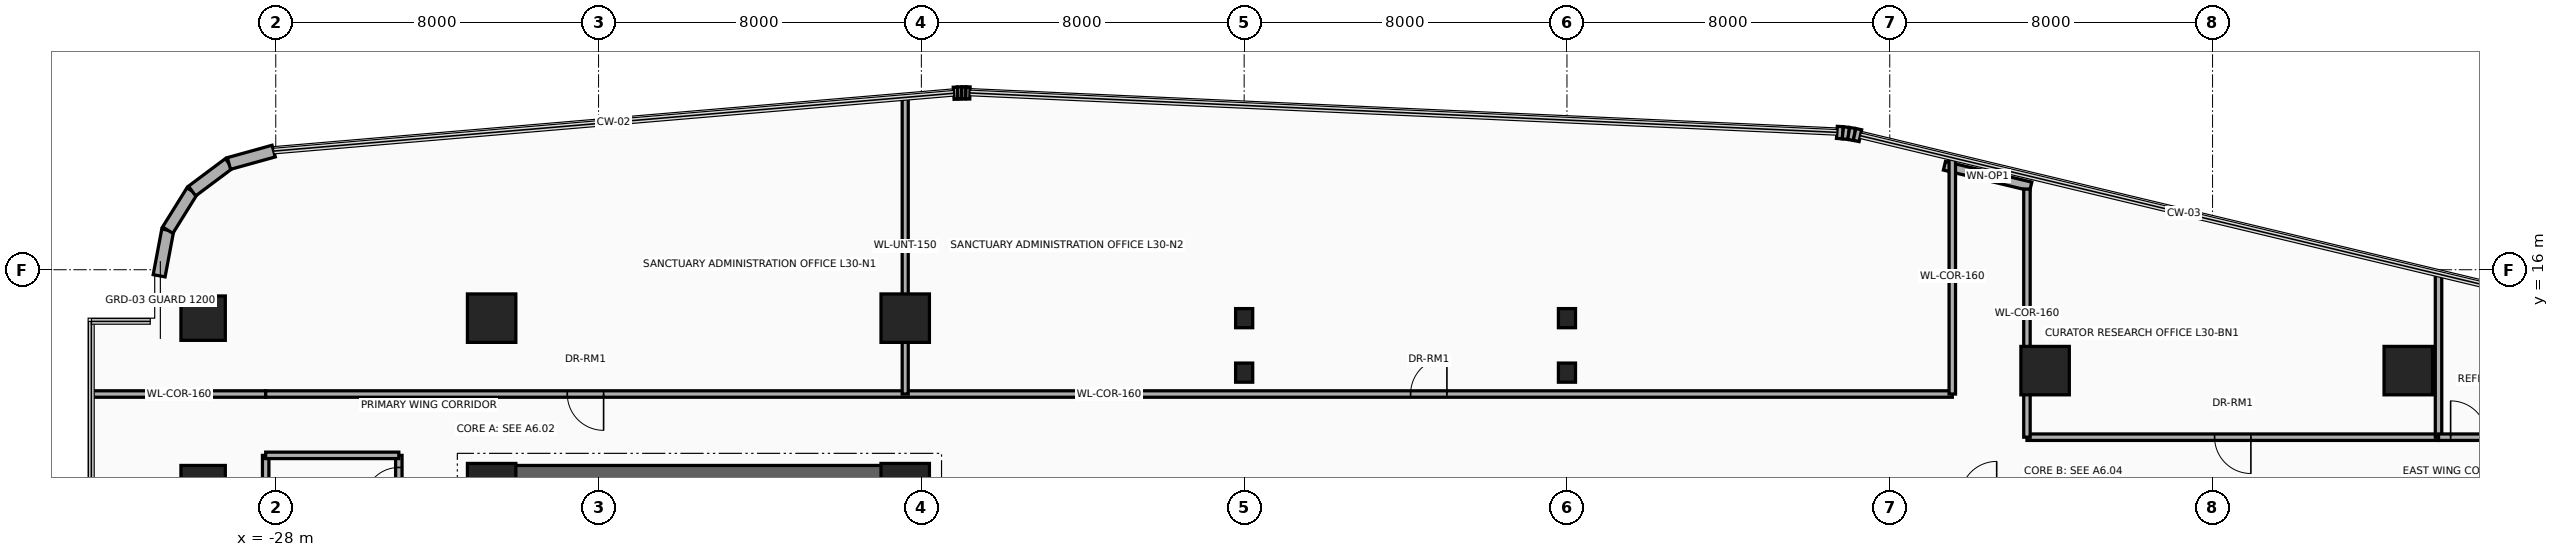
"""IFC4 building model, lengths in metres.
Left out: names, types, materials, properties, quantities, classifications, styles, units other than length and angle.
Written with IfcOpenShell. Run it as: python <this file> out.ifc"""

import sys

from ifc_helpers import new_model, si_unit, direction, frame, frame_2d, origin, origin_2d, place, context, subcontext, project, spatial, rectangle, circle, i_section, extrude, source, transform, mapped, element, fill, save


model = new_model("IFC4")
c1 = context("Model", 3, precision=1e-05, world=origin(), true_north=direction((0.0, 1.0)))
c2 = subcontext(c1, "Body", "Model", "MODEL_VIEW")
j1 = project(units=[si_unit("LENGTHUNIT", "METRE"), si_unit("PLANEANGLEUNIT", "RADIAN")], contexts=[c1])
p1 = place(None, origin())
s1 = spatial("IfcSite", under=j1, at=p1, CompositionType="ELEMENT")
p2 = place(p1, origin())
s2 = spatial("IfcBuilding", under=s1, at=p2, CompositionType="ELEMENT")
p3 = place(p2, frame((0.0, 0.0, 120.5)))
s3 = spatial("IfcBuildingStorey", under=s2, at=p3, CompositionType="ELEMENT", Elevation=120.5)
p4 = place(p3, frame((-22.65, -11.15, 0.0), z_axis=(0.0, 0.0, 1.0), x_axis=(0.0, 1.0, 0.0)))
e1 = element("IfcWall", 1, at=p4, inside=s3, PredefinedType="SHEAR", context=c2, shape_type="SweptSolid", body=[
    extrude(rectangle(XDim=22.3, YDim=0.7, at=frame_2d((11.15, 0.0))), origin(), (0.0, 0.0, 1.0), 3.46),
])
p5 = place(p3, frame((-22.65, 10.8, 0.0), z_axis=(0.0, 0.0, 1.0), x_axis=(1.0, 0.0, 0.0)))
e2 = element("IfcWall", 2, at=p5, inside=s3, PredefinedType="SHEAR", context=c2, shape_type="SweptSolid", body=[
    extrude(rectangle(XDim=10.25, YDim=0.7, at=frame_2d((5.125, 0.0))), origin(), (0.0, 0.0, 1.0), 3.46),
])
m1 = source(origin(), c2, "Body", "SweptSolid", [
    extrude(circle(Radius=0.55, at=origin_2d()), origin(), (0.0, 0.0, 1.0), 3.7),
])
p6 = place(p3, frame((-29.8, 10.6, 0.0), z_axis=(0.0, 0.0, 1.0), x_axis=(1.0, 0.0, 0.0)))
e3 = element("IfcColumn", 3, at=p6, inside=s3, PredefinedType="COLUMN", context=c2, shape_type="MappedRepresentation", body=[
    mapped(m1, transform((0.0, 0.0, 0.0), x_axis=(1.0, 0.0, 0.0), y_axis=(0.0, 1.0, 0.0), z_axis=(0.0, 0.0, 1.0), scale=1.0)),
])
m2 = source(origin(), c2, "Body", "SweptSolid", [
    extrude(rectangle(XDim=1.2, YDim=1.2, at=origin_2d()), origin(), (0.0, 0.0, 1.0), 3.7),
])
for number, where, z_axis, x_axis in (
    (4, (-22.65, 10.6, 0.0), (0.0, 0.0, 1.0), (1.0, 0.0, 0.0)),
    (5, (-12.4, 10.6, 0.0), (0.0, 0.0, 1.0), (1.0, 0.0, 0.0)),
):
    element("IfcColumn", number, at=place(p3, frame(where, z_axis=z_axis, x_axis=x_axis)), inside=s3, PredefinedType="COLUMN", context=c2, shape_type="MappedRepresentation", body=[
        mapped(m2, transform((0.0, 0.0, 0.0), x_axis=(1.0, 0.0, 0.0), y_axis=(0.0, 1.0, 0.0), z_axis=(0.0, 0.0, 1.0), scale=1.0)),
    ])
p7 = place(p3, frame((-29.8, 14.8, 0.0), z_axis=(0.0, 0.0, 1.0), x_axis=(1.0, 0.0, 0.0)))
e6 = element("IfcColumn", 6, at=p7, inside=s3, PredefinedType="COLUMN", context=c2, shape_type="MappedRepresentation", body=[
    mapped(m1, transform((0.0, 0.0, 0.0), x_axis=(1.0, 0.0, 0.0), y_axis=(0.0, 1.0, 0.0), z_axis=(0.0, 0.0, 1.0), scale=1.0)),
])
for number, where, z_axis, x_axis in (
    (7, (-22.65, 14.8, 0.0), (0.0, 0.0, 1.0), (1.0, 0.0, 0.0)),
    (8, (-12.4, 14.8, 0.0), (0.0, 0.0, 1.0), (1.0, 0.0, 0.0)),
    (9, (15.85, 13.5, 0.0), (0.0, 0.0, 1.0), (1.0, 0.0, 0.0)),
    (10, (24.85, 13.5, 0.0), (0.0, 0.0, 1.0), (1.0, 0.0, 0.0)),
):
    element("IfcColumn", number, at=place(p3, frame(where, z_axis=z_axis, x_axis=x_axis)), inside=s3, PredefinedType="COLUMN", context=c2, shape_type="MappedRepresentation", body=[
        mapped(m2, transform((0.0, 0.0, 0.0), x_axis=(1.0, 0.0, 0.0), y_axis=(0.0, 1.0, 0.0), z_axis=(0.0, 0.0, 1.0), scale=1.0)),
    ])
m3 = source(origin(), c2, "Body", "SweptSolid", [
    extrude(i_section(OverallWidth=0.424, OverallDepth=0.474, WebThickness=0.048, FlangeThickness=0.077, at=origin_2d()), origin(), (0.0, 0.0, 1.0), 3.7),
])
for number, where, z_axis, x_axis in (
    (11, (-4.0, 13.45, 0.0), (0.0, 0.0, 1.0), (1.0, 0.0, 0.0)),
    (12, (-4.0, 14.8, 0.0), (0.0, 0.0, 1.0), (1.0, 0.0, 0.0)),
    (13, (4.0, 13.45, 0.0), (0.0, 0.0, 1.0), (1.0, 0.0, 0.0)),
    (14, (4.0, 14.8, 0.0), (0.0, 0.0, 1.0), (1.0, 0.0, 0.0)),
):
    element("IfcColumn", number, at=place(p3, frame(where, z_axis=z_axis, x_axis=x_axis)), inside=s3, PredefinedType="COLUMN", context=c2, shape_type="MappedRepresentation", body=[
        mapped(m3, transform((0.0, 0.0, 0.0), x_axis=(1.0, 0.0, 0.0), y_axis=(0.0, 1.0, 0.0), z_axis=(0.0, 0.0, 1.0), scale=1.0)),
    ])
p8 = place(p3, frame((-30.89, 15.85, 0.0), z_axis=(0.0, 0.0, 1.0), x_axis=(0.184557499391, 0.982821718023, 0.0)))
e15 = element("IfcWall", 15, at=p8, inside=s3, PredefinedType="SOLIDWALL", context=c2, shape_type="SweptSolid", body=[
    extrude(rectangle(XDim=1.151, YDim=0.3, at=frame_2d((0.575, 0.0))), origin(), (0.0, 0.0, 1.0), 3.46),
])
p9 = place(p3, frame((-30.677, 16.981, 0.0), z_axis=(0.0, 0.0, 1.0), x_axis=(0.52880576008, 0.848742875143, 0.0)))
e16 = element("IfcWall", 16, at=p9, inside=s3, PredefinedType="SOLIDWALL", context=c2, shape_type="SweptSolid", body=[
    extrude(rectangle(XDim=1.141, YDim=0.3, at=frame_2d((0.57, 0.0))), origin(), (0.0, 0.0, 1.0), 3.46),
])
p10 = place(p3, frame((-30.074, 17.95, 0.0), z_axis=(0.0, 0.0, 1.0), x_axis=(0.800975009324, 0.598697782223, 0.0)))
e17 = element("IfcWall", 17, at=p10, inside=s3, PredefinedType="SOLIDWALL", context=c2, shape_type="SweptSolid", body=[
    extrude(rectangle(XDim=1.141, YDim=0.3, at=frame_2d((0.57, 0.0))), origin(), (0.0, 0.0, 1.0), 3.46),
])
p11 = place(p3, frame((-29.161, 18.633, 0.0), z_axis=(0.0, 0.0, 1.0), x_axis=(0.963624193367, 0.267260947313, 0.0)))
e18 = element("IfcWall", 18, at=p11, inside=s3, PredefinedType="SOLIDWALL", context=c2, shape_type="SweptSolid", body=[
    extrude(rectangle(XDim=1.151, YDim=0.3, at=frame_2d((0.575, 0.0))), origin(), (0.0, 0.0, 1.0), 3.46),
])
p12 = place(p3, frame((-11.199, 20.373, 0.0), z_axis=(0.0, 0.0, 1.0), x_axis=(0.997567332166, 0.069709524416, 0.0)))
e19 = element("IfcWall", 19, at=p12, inside=s3, PredefinedType="SOLIDWALL", context=c2, shape_type="SweptSolid", body=[
    extrude(rectangle(XDim=0.102, YDim=0.3, at=frame_2d((0.051, 0.0))), origin(), (0.0, 0.0, 1.0), 3.46),
])
p13 = place(p3, frame((-11.098, 20.38, 0.0), z_axis=(0.0, 0.0, 1.0), x_axis=(0.999334672785, 0.03647206835, 0.0)))
e20 = element("IfcWall", 20, at=p13, inside=s3, PredefinedType="SOLIDWALL", context=c2, shape_type="SweptSolid", body=[
    extrude(rectangle(XDim=0.1, YDim=0.3, at=frame_2d((0.05, 0.0))), origin(), (0.0, 0.0, 1.0), 3.46),
])
p14 = place(p3, frame((-10.998, 20.383, 0.0), z_axis=(0.0, 0.0, 1.0), x_axis=(0.999997054401, 0.002427177317, 0.0)))
e21 = element("IfcWall", 21, at=p14, inside=s3, PredefinedType="SOLIDWALL", context=c2, shape_type="SweptSolid", body=[
    extrude(rectangle(XDim=0.101, YDim=0.3, at=frame_2d((0.05, 0.0))), origin(), (0.0, 0.0, 1.0), 3.46),
])
p15 = place(p3, frame((-10.897, 20.384, 0.0), z_axis=(0.0, 0.0, 1.0), x_axis=(0.999584209171, -0.02883415988, 0.0)))
e22 = element("IfcWall", 22, at=p15, inside=s3, PredefinedType="SOLIDWALL", context=c2, shape_type="SweptSolid", body=[
    extrude(rectangle(XDim=0.102, YDim=0.3, at=frame_2d((0.051, 0.0))), origin(), (0.0, 0.0, 1.0), 3.46),
])
p16 = place(p3, frame((10.69, 19.404, 0.0), z_axis=(0.0, 0.0, 1.0), x_axis=(0.99758310784, -0.069483400546, 0.0)))
e23 = element("IfcWall", 23, at=p16, inside=s3, PredefinedType="SOLIDWALL", context=c2, shape_type="SweptSolid", body=[
    extrude(rectangle(XDim=0.147, YDim=0.3, at=frame_2d((0.074, 0.0))), origin(), (0.0, 0.0, 1.0), 3.46),
])
for number, where, z_axis, x_axis in (
    (24, (10.837, 19.394, 0.0), (0.0, 0.0, 1.0), (0.993, -0.117, 0.0)),
    (25, (10.983, 19.377, 0.0), (0.0, 0.0, 1.0), (0.987, -0.163, 0.0)),
):
    element("IfcWall", number, at=place(p3, frame(where, z_axis=z_axis, x_axis=x_axis)), inside=s3, PredefinedType="SOLIDWALL", context=c2, shape_type="SweptSolid", body=[
        extrude(rectangle(XDim=0.146, YDim=0.3, at=frame_2d((0.073, 0.0))), origin(), (0.0, 0.0, 1.0), 3.46),
    ])
p17 = place(p3, frame((11.127, 19.353, 0.0), z_axis=(0.0, 0.0, 1.0), x_axis=(0.978019841688, -0.208511844421, 0.0)))
e26 = element("IfcWall", 26, at=p17, inside=s3, PredefinedType="SOLIDWALL", context=c2, shape_type="SweptSolid", body=[
    extrude(rectangle(XDim=0.147, YDim=0.3, at=frame_2d((0.074, 0.0))), origin(), (0.0, 0.0, 1.0), 3.46),
])
p18 = place(p3, frame((13.355, 18.576, 0.0), z_axis=(0.0, 0.0, 1.0), x_axis=(0.97252211384, -0.232810519721, 0.0)))
e27 = element("IfcWall", 27, at=p18, inside=s3, PredefinedType="SOLIDWALL", context=c2, shape_type="SweptSolid", body=[
    extrude(rectangle(XDim=2.2, YDim=0.22, at=frame_2d((1.1, 0.0))), origin(), (0.0, 0.0, 1.0), 3.46),
])
p19 = place(p18, frame((0.65, 0.0, 0.95)))
e28 = element("IfcOpeningElement", 28, at=p19, cuts=e27, PredefinedType="OPENING", context=c2, shape_type="SweptSolid", body=[
    extrude(rectangle(XDim=0.9, YDim=1.3, at=frame_2d((0.45, 0.65))), frame((0.0, 0.125, 0.0), z_axis=(0.0, -1.0, 0.0), x_axis=(1.0, 0.0, 0.0)), (0.0, 0.0, 1.0), 0.25),
])
p20 = place(p3, frame((-28.25, 8.8, 0.0), z_axis=(0.0, 0.0, 1.0), x_axis=(0.0, 1.0, 0.0)))
e29 = element("IfcWall", 29, at=p20, inside=s3, PredefinedType="PARTITIONING", context=c2, shape_type="SweptSolid", body=[
    extrude(rectangle(XDim=2.6, YDim=0.16, at=frame_2d((1.3, 0.0))), origin(), (0.0, 0.0, 1.0), 2.666),
])
p21 = place(p3, frame((-24.95, 8.8, 0.0), z_axis=(0.0, 0.0, 1.0), x_axis=(0.0, 1.0, 0.0)))
e30 = element("IfcWall", 30, at=p21, inside=s3, PredefinedType="PARTITIONING", context=c2, shape_type="SweptSolid", body=[
    extrude(rectangle(XDim=2.6, YDim=0.16, at=frame_2d((1.3, 0.0))), origin(), (0.0, 0.0, 1.0), 2.666),
])
p22 = place(p21, frame((0.3, 0.0, 0.0)))
e31 = element("IfcOpeningElement", 31, at=p22, cuts=e30, PredefinedType="OPENING", context=c2, shape_type="SweptSolid", body=[
    extrude(rectangle(XDim=0.85, YDim=2.1, at=frame_2d((0.425, 1.05))), frame((0.0, 0.095, 0.0), z_axis=(0.0, -1.0, 0.0), x_axis=(1.0, 0.0, 0.0)), (0.0, 0.0, 1.0), 0.19),
])
p23 = place(p21, frame((1.45, 0.0, 0.0)))
e32 = element("IfcOpeningElement", 32, at=p23, cuts=e30, PredefinedType="OPENING", context=c2, shape_type="SweptSolid", body=[
    extrude(rectangle(XDim=0.85, YDim=2.1, at=frame_2d((0.425, 1.05))), frame((0.0, 0.095, 0.0), z_axis=(0.0, -1.0, 0.0), x_axis=(1.0, 0.0, 0.0)), (0.0, 0.0, 1.0), 0.19),
])
p24 = place(p3, frame((-28.25, 11.4, 0.0), z_axis=(0.0, 0.0, 1.0), x_axis=(1.0, 0.0, 0.0)))
e33 = element("IfcWall", 33, at=p24, inside=s3, PredefinedType="PARTITIONING", context=c2, shape_type="SweptSolid", body=[
    extrude(rectangle(XDim=3.3, YDim=0.16, at=frame_2d((1.65, 0.0))), origin(), (0.0, 0.0, 1.0), 3.46),
])
p25 = place(p3, frame((-32.54, 12.92, 0.0), z_axis=(0.0, 0.0, 1.0), x_axis=(1.0, 0.0, 0.0)))
e34 = element("IfcWall", 34, at=p25, inside=s3, PredefinedType="PARTITIONING", context=c2, shape_type="SweptSolid", body=[
    extrude(rectangle(XDim=4.29, YDim=0.16, at=frame_2d((2.145, 0.0))), origin(), (0.0, 0.0, 1.0), 2.896),
])
p26 = place(p3, frame((-28.25, 12.92, 0.0), z_axis=(0.0, 0.0, 1.0), x_axis=(1.0, 0.0, 0.0)))
e35 = element("IfcWall", 35, at=p26, inside=s3, PredefinedType="PARTITIONING", context=c2, shape_type="SweptSolid", body=[
    extrude(rectangle(XDim=41.8, YDim=0.16, at=frame_2d((20.9, 0.0))), origin(), (0.0, 0.0, 1.0), 2.666),
])
p27 = place(p26, frame((7.475, 0.0, 0.0)))
e36 = element("IfcOpeningElement", 36, at=p27, cuts=e35, PredefinedType="OPENING", context=c2, shape_type="SweptSolid", body=[
    extrude(rectangle(XDim=0.9, YDim=2.1, at=frame_2d((0.45, 1.05))), frame((0.0, 0.095, 0.0), z_axis=(0.0, -1.0, 0.0), x_axis=(1.0, 0.0, 0.0)), (0.0, 0.0, 1.0), 0.19),
])
p28 = place(p26, frame((28.375, 0.0, 0.0)))
e37 = element("IfcOpeningElement", 37, at=p28, cuts=e35, PredefinedType="OPENING", context=c2, shape_type="SweptSolid", body=[
    extrude(rectangle(XDim=0.9, YDim=2.1, at=frame_2d((0.45, 1.05))), frame((0.0, 0.095, 0.0), z_axis=(0.0, -1.0, 0.0), x_axis=(1.0, 0.0, 0.0)), (0.0, 0.0, 1.0), 0.19),
])
p29 = place(p3, frame((13.55, 12.92, 0.0), z_axis=(0.0, 0.0, 1.0), x_axis=(0.0, 1.0, 0.0)))
e38 = element("IfcWall", 38, at=p29, inside=s3, PredefinedType="PARTITIONING", context=c2, shape_type="SweptSolid", body=[
    extrude(rectangle(XDim=5.857, YDim=0.16, at=frame_2d((2.928, 0.0))), origin(), (0.0, 0.0, 1.0), 2.666),
])
p30 = place(p3, frame((-12.4, 12.92, 0.0), z_axis=(0.0, 0.0, 1.0), x_axis=(0.0, 1.0, 0.0)))
e39 = element("IfcWall", 39, at=p30, inside=s3, PredefinedType="PARTITIONING", context=c2, shape_type="SweptSolid", body=[
    extrude(rectangle(XDim=7.351, YDim=0.15, at=frame_2d((3.675, 0.0))), origin(), (0.0, 0.0, 1.0), 2.666),
])
p31 = place(p3, frame((15.4, 11.85, 0.0), z_axis=(0.0, 0.0, 1.0), x_axis=(1.0, 0.0, 0.0)))
e40 = element("IfcWall", 40, at=p31, inside=s3, PredefinedType="PARTITIONING", context=c2, shape_type="SweptSolid", body=[
    extrude(rectangle(XDim=10.2, YDim=0.16, at=frame_2d((5.1, 0.0))), origin(), (0.0, 0.0, 1.0), 2.834),
])
p32 = place(p31, frame((4.65, 0.0, 0.0)))
e41 = element("IfcOpeningElement", 41, at=p32, cuts=e40, PredefinedType="OPENING", context=c2, shape_type="SweptSolid", body=[
    extrude(rectangle(XDim=0.9, YDim=2.1, at=frame_2d((0.45, 1.05))), frame((0.0, 0.095, 0.0), z_axis=(0.0, -1.0, 0.0), x_axis=(1.0, 0.0, 0.0)), (0.0, 0.0, 1.0), 0.19),
])
p33 = place(p3, frame((15.4, 11.85, 0.0), z_axis=(0.0, 0.0, 1.0), x_axis=(0.0, 1.0, 0.0)))
e42 = element("IfcWall", 42, at=p33, inside=s3, PredefinedType="PARTITIONING", context=c2, shape_type="SweptSolid", body=[
    extrude(rectangle(XDim=6.15, YDim=0.16, at=frame_2d((3.075, 0.0))), origin(), (0.0, 0.0, 1.0), 2.666),
])
p34 = place(p3, frame((25.6, 11.85, 0.0), z_axis=(0.0, 0.0, 1.0), x_axis=(0.0, 1.0, 0.0)))
e43 = element("IfcWall", 43, at=p34, inside=s3, PredefinedType="PARTITIONING", context=c2, shape_type="SweptSolid", body=[
    extrude(rectangle(XDim=4.042, YDim=0.16, at=frame_2d((2.021, 0.0))), origin(), (0.0, 0.0, 1.0), 2.666),
])
p35 = place(p3, frame((25.6, 11.85, 0.0), z_axis=(0.0, 0.0, 1.0), x_axis=(1.0, 0.0, 0.0)))
e44 = element("IfcWall", 44, at=p35, inside=s3, PredefinedType="PARTITIONING", context=c2, shape_type="SweptSolid", body=[
    extrude(rectangle(XDim=4.09, YDim=0.16, at=frame_2d((2.045, 0.0))), origin(), (0.0, 0.0, 1.0), 2.896),
])
p36 = place(p35, frame((0.3, 0.0, 0.0)))
e45 = element("IfcOpeningElement", 45, at=p36, cuts=e44, PredefinedType="OPENING", context=c2, shape_type="SweptSolid", body=[
    extrude(rectangle(XDim=0.9, YDim=2.1, at=frame_2d((0.45, 1.05))), frame((0.0, 0.095, 0.0), z_axis=(0.0, -1.0, 0.0), x_axis=(1.0, 0.0, 0.0)), (0.0, 0.0, 1.0), 0.19),
])
p37 = place(p19, origin())
e46 = element("IfcWindow", 46, at=p37, inside=s3, PartitioningType="SINGLE_PANEL", PredefinedType="WINDOW", context=c2, shape_type="SweptSolid", body=[
    extrude(rectangle(XDim=0.9, YDim=1.3, at=frame_2d((0.45, 0.65))), frame((0.0, 0.03, 0.0), z_axis=(0.0, -1.0, 0.0), x_axis=(1.0, 0.0, 0.0)), (0.0, 0.0, 1.0), 0.06),
])
fill(e28, e46)
p38 = place(p23, origin())
e47 = element("IfcDoor", 47, at=p38, inside=s3, OperationType="SINGLE_SWING_RIGHT", PredefinedType="DOOR", context=c2, shape_type="SweptSolid", body=[
    extrude(rectangle(XDim=0.85, YDim=2.1, at=frame_2d((0.425, 1.05))), frame((0.0, 0.025, 0.0), z_axis=(0.0, -1.0, 0.0), x_axis=(1.0, 0.0, 0.0)), (0.0, 0.0, 1.0), 0.05),
])
fill(e32, e47)
p39 = place(p27, frame((0.9, 0.0, 0.0), z_axis=(0.0, 0.0, 1.0), x_axis=(-1.0, 0.0, 0.0)))
e48 = element("IfcDoor", 48, at=p39, inside=s3, OperationType="SINGLE_SWING_LEFT", PredefinedType="DOOR", context=c2, shape_type="SweptSolid", body=[
    extrude(rectangle(XDim=0.9, YDim=2.1, at=frame_2d((0.45, 1.05))), frame((0.0, 0.025, 0.0), z_axis=(0.0, -1.0, 0.0), x_axis=(1.0, 0.0, 0.0)), (0.0, 0.0, 1.0), 0.05),
])
fill(e36, e48)
p40 = place(p28, origin())
e49 = element("IfcDoor", 49, at=p40, inside=s3, OperationType="SINGLE_SWING_RIGHT", PredefinedType="DOOR", context=c2, shape_type="SweptSolid", body=[
    extrude(rectangle(XDim=0.9, YDim=2.1, at=frame_2d((0.45, 1.05))), frame((0.0, 0.025, 0.0), z_axis=(0.0, -1.0, 0.0), x_axis=(1.0, 0.0, 0.0)), (0.0, 0.0, 1.0), 0.05),
])
fill(e37, e49)
p41 = place(p32, frame((0.9, 0.0, 0.0), z_axis=(0.0, 0.0, 1.0), x_axis=(-1.0, 0.0, 0.0)))
e50 = element("IfcDoor", 50, at=p41, inside=s3, OperationType="SINGLE_SWING_LEFT", PredefinedType="DOOR", context=c2, shape_type="SweptSolid", body=[
    extrude(rectangle(XDim=0.9, YDim=2.1, at=frame_2d((0.45, 1.05))), frame((0.0, 0.025, 0.0), z_axis=(0.0, -1.0, 0.0), x_axis=(1.0, 0.0, 0.0)), (0.0, 0.0, 1.0), 0.05),
])
fill(e41, e50)
p42 = place(p36, origin())
e51 = element("IfcDoor", 51, at=p42, inside=s3, OperationType="SINGLE_SWING_LEFT", PredefinedType="DOOR", context=c2, shape_type="SweptSolid", body=[
    extrude(rectangle(XDim=0.9, YDim=2.1, at=frame_2d((0.45, 1.05))), frame((0.0, 0.025, 0.0), z_axis=(0.0, -1.0, 0.0), x_axis=(1.0, 0.0, 0.0)), (0.0, 0.0, 1.0), 0.05),
])
fill(e45, e51)
save(model, sys.argv[1])
